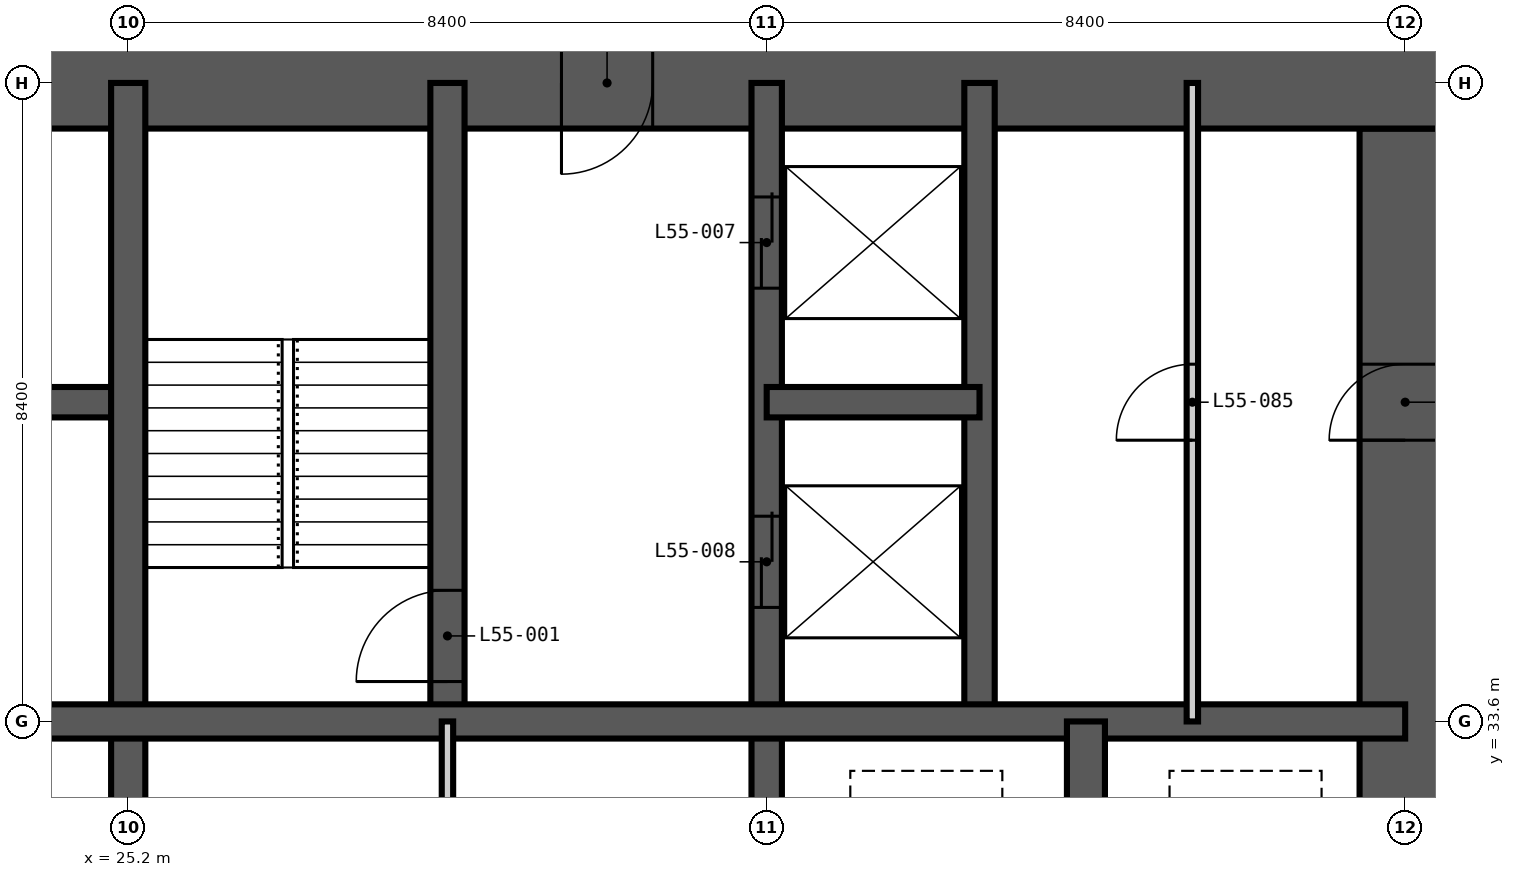
"""IFC4 building model, lengths in metres.
Left out: names, types, materials, properties, quantities, classifications, styles, units other than length and angle.
Written with IfcOpenShell. Run it as: python <this file> out.ifc"""

import sys

from ifc_helpers import new_model, si_unit, direction, frame, frame_2d, origin, place, context, subcontext, project, spatial, rectangle, extrude, element, fill, save


model = new_model("IFC4")
c1 = context("Model", 3, precision=1e-05, world=origin(), true_north=direction((0.0, 1.0)))
c2 = subcontext(c1, "Body", "Model", "MODEL_VIEW")
j1 = project(units=[si_unit("LENGTHUNIT", "METRE"), si_unit("PLANEANGLEUNIT", "RADIAN")], contexts=[c1])
p1 = place(None, origin())
s1 = spatial("IfcSite", under=j1, at=p1, CompositionType="ELEMENT")
p2 = place(p1, origin())
s2 = spatial("IfcBuilding", under=s1, at=p2, CompositionType="ELEMENT")
p3 = place(p2, frame((0.0, 0.0, 213.0)))
s3 = spatial("IfcBuildingStorey", under=s2, at=p3, CompositionType="ELEMENT", Elevation=213.0)
p4 = place(p3, frame((42.0, 17.4, -0.35), z_axis=(0.0, 0.0, 1.0), x_axis=(0.0, 1.0, 0.0)))
e1 = element("IfcWall", 1, at=p4, inside=s3, PredefinedType="SHEAR", context=c2, shape_type="SweptSolid", body=[
    extrude(rectangle(XDim=24.0, YDim=1.2, at=frame_2d((12.0, 0.0))), origin(), (0.0, 0.0, 1.0), 3.6),
])
p5 = place(p4, frame((0.2, 0.0, 0.35)))
e2 = element("IfcOpeningElement", 2, at=p5, cuts=e1, PredefinedType="OPENING", context=c2, shape_type="SweptSolid", body=[
    extrude(rectangle(XDim=1.2, YDim=2.2, at=frame_2d((0.6, 1.1))), frame((0.0, 0.61, 0.0), z_axis=(0.0, -1.0, 0.0), x_axis=(1.0, 0.0, 0.0)), (0.0, 0.0, 1.0), 1.22),
])
p6 = place(p4, frame((11.5, 0.0, 0.35)))
e3 = element("IfcOpeningElement", 3, at=p6, cuts=e1, PredefinedType="OPENING", context=c2, shape_type="SweptSolid", body=[
    extrude(rectangle(XDim=1.0, YDim=2.1, at=frame_2d((0.5, 1.05))), frame((0.0, 0.61, 0.0), z_axis=(0.0, -1.0, 0.0), x_axis=(1.0, 0.0, 0.0)), (0.0, 0.0, 1.0), 1.22),
])
p7 = place(p4, frame((19.9, 0.0, 0.35)))
e4 = element("IfcOpeningElement", 4, at=p7, cuts=e1, PredefinedType="OPENING", context=c2, shape_type="SweptSolid", body=[
    extrude(rectangle(XDim=1.0, YDim=2.1, at=frame_2d((0.5, 1.05))), frame((0.0, 0.61, 0.0), z_axis=(0.0, -1.0, 0.0), x_axis=(1.0, 0.0, 0.0)), (0.0, 0.0, 1.0), 1.22),
])
p8 = place(p3, frame((42.6, 42.0, -0.35), z_axis=(0.0, 0.0, 1.0), x_axis=(-1.0, 0.0, 0.0)))
e5 = element("IfcWall", 5, at=p8, inside=s3, PredefinedType="SHEAR", context=c2, shape_type="SweptSolid", body=[
    extrude(rectangle(XDim=26.4, YDim=1.2, at=frame_2d((13.2, 0.0))), origin(), (0.0, 0.0, 1.0), 3.6),
])
p9 = place(p8, frame((21.1, 0.0, 0.35)))
e6 = element("IfcOpeningElement", 6, at=p9, cuts=e5, PredefinedType="OPENING", context=c2, shape_type="SweptSolid", body=[
    extrude(rectangle(XDim=1.0, YDim=2.1, at=frame_2d((0.5, 1.05))), frame((0.0, 0.61, 0.0), z_axis=(0.0, -1.0, 0.0), x_axis=(1.0, 0.0, 0.0)), (0.0, 0.0, 1.0), 1.22),
])
p10 = place(p8, frame((10.5, 0.0, 0.35)))
e7 = element("IfcOpeningElement", 7, at=p10, cuts=e5, PredefinedType="OPENING", context=c2, shape_type="SweptSolid", body=[
    extrude(rectangle(XDim=1.2, YDim=2.2, at=frame_2d((0.6, 1.1))), frame((0.0, 0.61, 0.0), z_axis=(0.0, -1.0, 0.0), x_axis=(1.0, 0.0, 0.0)), (0.0, 0.0, 1.0), 1.22),
])
p11 = place(p3, frame((33.6, 16.8, -0.35), z_axis=(0.0, 0.0, 1.0), x_axis=(0.0, 1.0, 0.0)))
e8 = element("IfcWall", 8, at=p11, inside=s3, PredefinedType="SHEAR", context=c2, shape_type="SweptSolid", body=[
    extrude(rectangle(XDim=25.2, YDim=0.4, at=frame_2d((12.6, 0.0))), origin(), (0.0, 0.0, 1.0), 3.6),
])
p12 = place(p11, frame((22.5, 0.0, 0.35)))
e9 = element("IfcOpeningElement", 9, at=p12, cuts=e8, PredefinedType="OPENING", context=c2, shape_type="SweptSolid", body=[
    extrude(rectangle(XDim=1.2, YDim=2.2, at=frame_2d((0.6, 1.1))), frame((0.0, 0.21, 0.0), z_axis=(0.0, -1.0, 0.0), x_axis=(1.0, 0.0, 0.0)), (0.0, 0.0, 1.0), 0.42),
])
p13 = place(p11, frame((18.3, 0.0, 0.35)))
e10 = element("IfcOpeningElement", 10, at=p13, cuts=e8, PredefinedType="OPENING", context=c2, shape_type="SweptSolid", body=[
    extrude(rectangle(XDim=1.2, YDim=2.2, at=frame_2d((0.6, 1.1))), frame((0.0, 0.21, 0.0), z_axis=(0.0, -1.0, 0.0), x_axis=(1.0, 0.0, 0.0)), (0.0, 0.0, 1.0), 0.42),
])
p14 = place(p11, frame((12.1, 0.0, 0.35)))
e11 = element("IfcOpeningElement", 11, at=p14, cuts=e8, PredefinedType="OPENING", context=c2, shape_type="SweptSolid", body=[
    extrude(rectangle(XDim=1.0, YDim=2.1, at=frame_2d((0.5, 1.05))), frame((0.0, 0.21, 0.0), z_axis=(0.0, -1.0, 0.0), x_axis=(1.0, 0.0, 0.0)), (0.0, 0.0, 1.0), 0.42),
])
for number, where, z_axis, x_axis in (
    (12, (36.4, 33.6, -0.35), (0.0, 0.0, 1.0), (0.0, 1.0, 0.0)),
    (13, (16.8, 37.8, -0.35), (0.0, 0.0, 1.0), (1.0, 0.0, 0.0)),
):
    element("IfcWall", number, at=place(p3, frame(where, z_axis=z_axis, x_axis=x_axis)), inside=s3, PredefinedType="SHEAR", context=c2, shape_type="SweptSolid", body=[
        extrude(rectangle(XDim=8.4, YDim=0.4, at=frame_2d((4.2, 0.0))), origin(), (0.0, 0.0, 1.0), 3.6),
    ])
p15 = place(p3, frame((33.6, 37.8, -0.35), z_axis=(0.0, 0.0, 1.0), x_axis=(1.0, 0.0, 0.0)))
e14 = element("IfcWall", 14, at=p15, inside=s3, PredefinedType="SHEAR", context=c2, shape_type="SweptSolid", body=[
    extrude(rectangle(XDim=2.8, YDim=0.4, at=frame_2d((1.4, 0.0))), origin(), (0.0, 0.0, 1.0), 3.6),
])
p16 = place(p3, frame((25.2, 16.8, -0.35), z_axis=(0.0, 0.0, 1.0), x_axis=(0.0, 1.0, 0.0)))
e15 = element("IfcWall", 15, at=p16, inside=s3, PredefinedType="SHEAR", context=c2, shape_type="SweptSolid", body=[
    extrude(rectangle(XDim=25.2, YDim=0.45, at=frame_2d((12.6, 0.0))), origin(), (0.0, 0.0, 1.0), 3.6),
])
p17 = place(p3, frame((29.4, 33.6, -0.35), z_axis=(0.0, 0.0, 1.0), x_axis=(0.0, 1.0, 0.0)))
e16 = element("IfcWall", 16, at=p17, inside=s3, PredefinedType="SHEAR", context=c2, shape_type="SweptSolid", body=[
    extrude(rectangle(XDim=8.4, YDim=0.45, at=frame_2d((4.2, 0.0))), origin(), (0.0, 0.0, 1.0), 3.6),
])
p18 = place(p17, frame((0.525, 0.0, 0.35)))
e17 = element("IfcOpeningElement", 17, at=p18, cuts=e16, PredefinedType="OPENING", context=c2, shape_type="SweptSolid", body=[
    extrude(rectangle(XDim=1.2, YDim=2.2, at=frame_2d((0.6, 1.1))), frame((0.0, 0.235, 0.0), z_axis=(0.0, -1.0, 0.0), x_axis=(1.0, 0.0, 0.0)), (0.0, 0.0, 1.0), 0.47),
])
p19 = place(p3, frame((16.8, 33.6, -0.35), z_axis=(0.0, 0.0, 1.0), x_axis=(1.0, 0.0, 0.0)))
e18 = element("IfcWall", 18, at=p19, inside=s3, PredefinedType="SHEAR", context=c2, shape_type="SweptSolid", body=[
    extrude(rectangle(XDim=25.2, YDim=0.45, at=frame_2d((12.6, 0.0))), origin(), (0.0, 0.0, 1.0), 3.6),
])
p20 = place(p3, frame((37.8, 30.8, -0.35), z_axis=(0.0, 0.0, 1.0), x_axis=(0.0, 1.0, 0.0)))
e19 = element("IfcWall", 19, at=p20, inside=s3, PredefinedType="SHEAR", context=c2, shape_type="SweptSolid", body=[
    extrude(rectangle(XDim=2.8, YDim=0.5, at=frame_2d((1.4, 0.0))), origin(), (0.0, 0.0, 1.0), 3.6),
])
p21 = place(p3, frame((29.4, 25.2, 0.0), z_axis=(0.0, 0.0, 1.0), x_axis=(0.0, 1.0, 0.0)))
e20 = element("IfcWall", 20, at=p21, inside=s3, PredefinedType="PARTITIONING", context=c2, shape_type="SweptSolid", body=[
    extrude(rectangle(XDim=8.4, YDim=0.15, at=frame_2d((4.2, 0.0))), origin(), (0.0, 0.0, 1.0), 3.25),
])
p22 = place(p21, frame((3.7, 0.0, 0.0)))
e21 = element("IfcOpeningElement", 21, at=p22, cuts=e20, PredefinedType="OPENING", context=c2, shape_type="SweptSolid", body=[
    extrude(rectangle(XDim=1.0, YDim=2.1, at=frame_2d((0.5, 1.05))), frame((0.0, 0.085, 0.0), z_axis=(0.0, -1.0, 0.0), x_axis=(1.0, 0.0, 0.0)), (0.0, 0.0, 1.0), 0.17),
])
p23 = place(p3, frame((39.2, 33.6, 0.0), z_axis=(0.0, 0.0, 1.0), x_axis=(0.0, 1.0, 0.0)))
e22 = element("IfcWall", 22, at=p23, inside=s3, PredefinedType="PARTITIONING", context=c2, shape_type="SweptSolid", body=[
    extrude(rectangle(XDim=8.4, YDim=0.15, at=frame_2d((4.2, 0.0))), origin(), (0.0, 0.0, 1.0), 3.25),
])
p24 = place(p23, frame((3.7, 0.0, 0.0)))
e23 = element("IfcOpeningElement", 23, at=p24, cuts=e22, PredefinedType="OPENING", context=c2, shape_type="SweptSolid", body=[
    extrude(rectangle(XDim=1.0, YDim=2.1, at=frame_2d((0.5, 1.05))), frame((0.0, 0.085, 0.0), z_axis=(0.0, -1.0, 0.0), x_axis=(1.0, 0.0, 0.0)), (0.0, 0.0, 1.0), 0.17),
])
p25 = place(p18, origin())
e24 = element("IfcDoor", 24, at=p25, inside=s3, OperationType="SINGLE_SWING_LEFT", PredefinedType="DOOR", context=c2, shape_type="SweptSolid", body=[
    extrude(rectangle(XDim=1.2, YDim=2.2, at=frame_2d((0.6, 1.1))), frame((0.0, 0.025, 0.0), z_axis=(0.0, -1.0, 0.0), x_axis=(1.0, 0.0, 0.0)), (0.0, 0.0, 1.0), 0.05),
])
fill(e17, e24)
p26 = place(p12, origin())
e25 = element("IfcDoor", 25, at=p26, inside=s3, OperationType="DOUBLE_DOOR_SLIDING", PredefinedType="DOOR", context=c2, shape_type="SweptSolid", body=[
    extrude(rectangle(XDim=1.2, YDim=2.2, at=frame_2d((0.6, 1.1))), frame((0.0, 0.025, 0.0), z_axis=(0.0, -1.0, 0.0), x_axis=(1.0, 0.0, 0.0)), (0.0, 0.0, 1.0), 0.05),
])
fill(e9, e25)
p27 = place(p13, origin())
e26 = element("IfcDoor", 26, at=p27, inside=s3, OperationType="DOUBLE_DOOR_SLIDING", PredefinedType="DOOR", context=c2, shape_type="SweptSolid", body=[
    extrude(rectangle(XDim=1.2, YDim=2.2, at=frame_2d((0.6, 1.1))), frame((0.0, 0.025, 0.0), z_axis=(0.0, -1.0, 0.0), x_axis=(1.0, 0.0, 0.0)), (0.0, 0.0, 1.0), 0.05),
])
fill(e10, e26)
p28 = place(p10, origin())
e27 = element("IfcDoor", 27, at=p28, inside=s3, OperationType="SINGLE_SWING_RIGHT", PredefinedType="DOOR", context=c2, shape_type="SweptSolid", body=[
    extrude(rectangle(XDim=1.2, YDim=2.2, at=frame_2d((0.6, 1.1))), frame((0.0, 0.025, 0.0), z_axis=(0.0, -1.0, 0.0), x_axis=(1.0, 0.0, 0.0)), (0.0, 0.0, 1.0), 0.05),
])
fill(e7, e27)
p29 = place(p7, origin())
e28 = element("IfcDoor", 28, at=p29, inside=s3, OperationType="SINGLE_SWING_LEFT", PredefinedType="DOOR", context=c2, shape_type="SweptSolid", body=[
    extrude(rectangle(XDim=1.0, YDim=2.1, at=frame_2d((0.5, 1.05))), frame((0.0, 0.025, 0.0), z_axis=(0.0, -1.0, 0.0), x_axis=(1.0, 0.0, 0.0)), (0.0, 0.0, 1.0), 0.05),
])
fill(e4, e28)
p30 = place(p24, origin())
e29 = element("IfcDoor", 29, at=p30, inside=s3, OperationType="SINGLE_SWING_LEFT", PredefinedType="DOOR", context=c2, shape_type="SweptSolid", body=[
    extrude(rectangle(XDim=1.0, YDim=2.1, at=frame_2d((0.5, 1.05))), frame((0.0, 0.025, 0.0), z_axis=(0.0, -1.0, 0.0), x_axis=(1.0, 0.0, 0.0)), (0.0, 0.0, 1.0), 0.05),
])
fill(e23, e29)
save(model, sys.argv[1])
